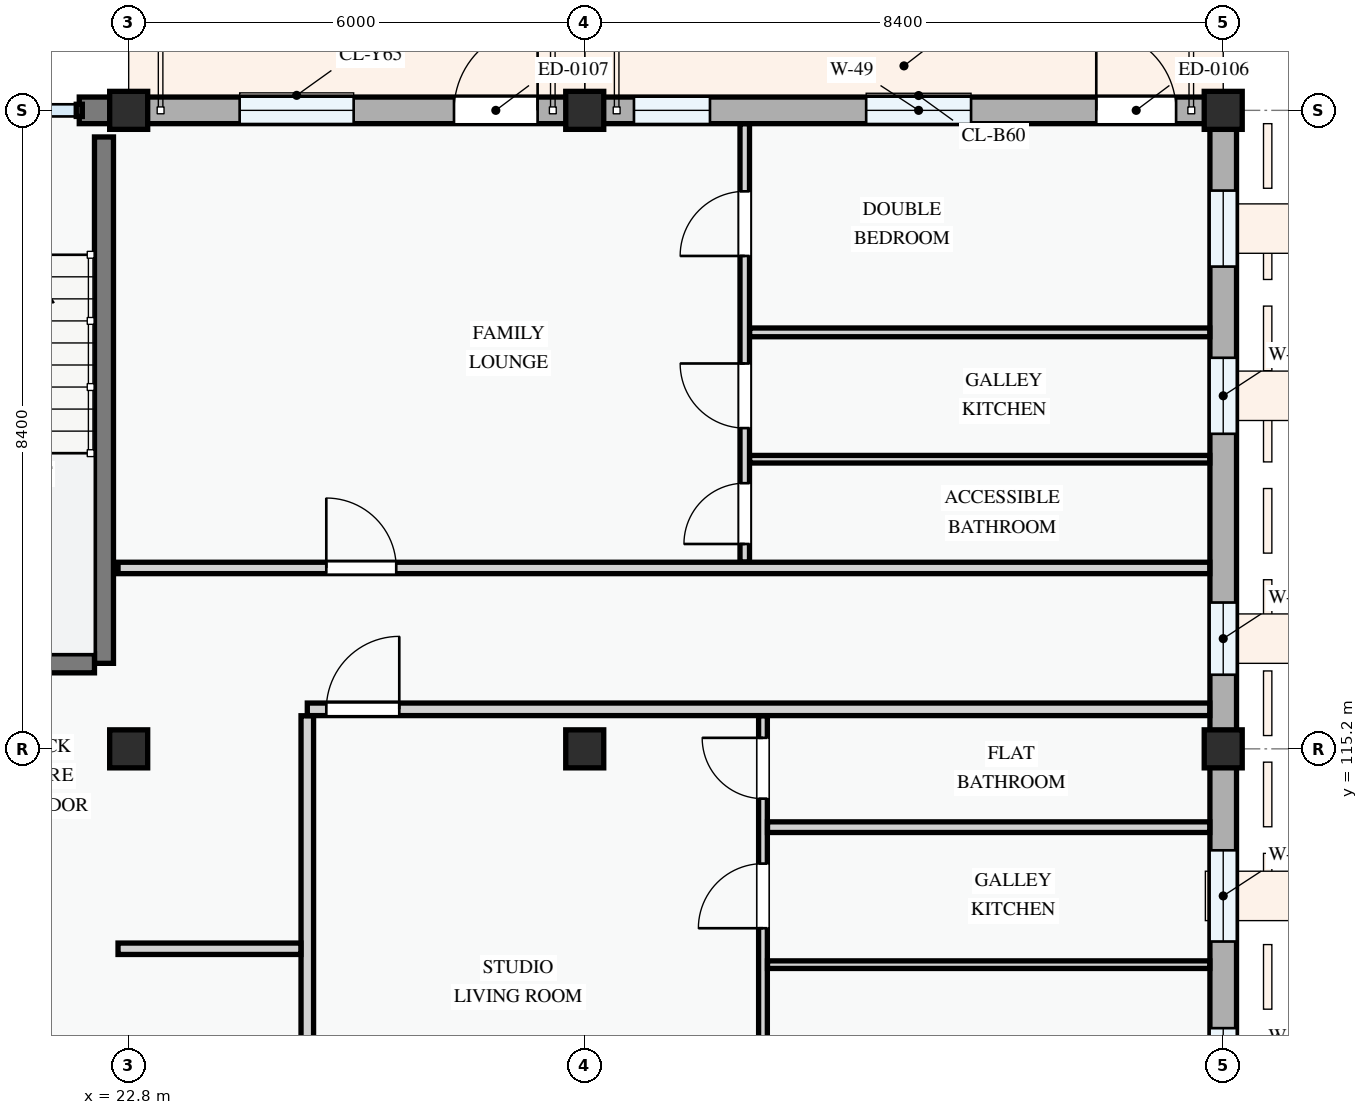
"""IFC4 building model, lengths in metres.
Left out: names, types, materials, properties, quantities, classifications, styles, units other than length and angle.
Written with IfcOpenShell. Run it as: python <this file> out.ifc"""

import sys

from ifc_helpers import new_model, si_unit, direction, frame, frame_2d, origin, origin_2d, place, context, subcontext, project, spatial, rectangle, extrude, element, fill, save


model = new_model("IFC4")
c1 = context("Model", 3, precision=1e-05, world=origin(), true_north=direction((0.0, 1.0)))
c2 = subcontext(c1, "Body", "Model", "MODEL_VIEW")
j1 = project(units=[si_unit("LENGTHUNIT", "METRE"), si_unit("PLANEANGLEUNIT", "RADIAN")], contexts=[c1])
p1 = place(None, origin())
s1 = spatial("IfcSite", under=j1, at=p1, CompositionType="ELEMENT")
p2 = place(p1, origin())
s2 = spatial("IfcBuilding", under=s1, at=p2, CompositionType="ELEMENT")
p3 = place(p2, frame((0.0, 0.0, 47.7)))
s3 = spatial("IfcBuildingStorey", under=s2, at=p3, CompositionType="ELEMENT", Elevation=47.7)
for number, where, z_axis, x_axis in (
    (1, (22.8, 115.2, 0.0), (0.0, 0.0, 1.0), (1.0, 0.0, 0.0)),
    (2, (22.8, 123.6, 0.0), (0.0, 0.0, 1.0), (1.0, 0.0, 0.0)),
    (3, (28.8, 115.2, 0.0), (0.0, 0.0, 1.0), (1.0, 0.0, 0.0)),
    (4, (28.8, 123.6, 0.0), (0.0, 0.0, 1.0), (1.0, 0.0, 0.0)),
    (5, (37.2, 115.2, 0.0), (0.0, 0.0, 1.0), (1.0, 0.0, 0.0)),
    (6, (37.2, 123.6, 0.0), (0.0, 0.0, 1.0), (1.0, 0.0, 0.0)),
):
    element("IfcColumn", number, at=place(p3, frame(where, z_axis=z_axis, x_axis=x_axis)), inside=s3, PredefinedType="COLUMN", context=c2, shape_type="SweptSolid", body=[
        extrude(rectangle(XDim=0.5, YDim=0.5, at=origin_2d()), origin(), (0.0, 0.0, 1.0), 3.3),
    ])
p4 = place(p3, frame((37.2, 109.2, 0.0), z_axis=(0.0, 0.0, 1.0), x_axis=(0.0, 1.0, 0.0)))
e7 = element("IfcWall", 7, at=p4, inside=s3, PredefinedType="STANDARD", context=c2, shape_type="SweptSolid", body=[
    extrude(rectangle(XDim=6.0, YDim=0.35, at=frame_2d((3.0, 0.0))), origin(), (0.0, 0.0, 1.0), 2.575),
])
p5 = place(p4, frame((1.025, 0.0, 0.78)))
e8 = element("IfcOpeningElement", 8, at=p5, cuts=e7, PredefinedType="OPENING", context=c2, shape_type="SweptSolid", body=[
    extrude(rectangle(XDim=1.3, YDim=1.4, at=frame_2d((0.65, 0.7))), frame((0.0, 0.185, 0.0), z_axis=(0.0, -1.0, 0.0), x_axis=(1.0, 0.0, 0.0)), (0.0, 0.0, 1.0), 0.37),
])
p6 = place(p4, frame((3.465, 0.0, 0.78)))
e9 = element("IfcOpeningElement", 9, at=p6, cuts=e7, PredefinedType="OPENING", context=c2, shape_type="SweptSolid", body=[
    extrude(rectangle(XDim=1.2, YDim=1.5, at=frame_2d((0.6, 0.75))), frame((0.0, 0.185, 0.0), z_axis=(0.0, -1.0, 0.0), x_axis=(1.0, 0.0, 0.0)), (0.0, 0.0, 1.0), 0.37),
])
p7 = place(p3, frame((37.2, 115.2, 0.0), z_axis=(0.0, 0.0, 1.0), x_axis=(0.0, 1.0, 0.0)))
e10 = element("IfcWall", 10, at=p7, inside=s3, PredefinedType="STANDARD", context=c2, shape_type="SweptSolid", body=[
    extrude(rectangle(XDim=8.4, YDim=0.35, at=frame_2d((4.2, 0.0))), origin(), (0.0, 0.0, 1.0), 2.425),
])
p8 = place(p7, frame((0.975, 0.0, 0.78)))
e11 = element("IfcOpeningElement", 11, at=p8, cuts=e10, PredefinedType="OPENING", context=c2, shape_type="SweptSolid", body=[
    extrude(rectangle(XDim=0.95, YDim=1.15, at=frame_2d((0.475, 0.575))), frame((0.0, 0.185, 0.0), z_axis=(0.0, -1.0, 0.0), x_axis=(1.0, 0.0, 0.0)), (0.0, 0.0, 1.0), 0.37),
])
p9 = place(p7, frame((4.145, 0.0, 0.78)))
e12 = element("IfcOpeningElement", 12, at=p9, cuts=e10, PredefinedType="OPENING", context=c2, shape_type="SweptSolid", body=[
    extrude(rectangle(XDim=1.0, YDim=1.25, at=frame_2d((0.5, 0.625))), frame((0.0, 0.185, 0.0), z_axis=(0.0, -1.0, 0.0), x_axis=(1.0, 0.0, 0.0)), (0.0, 0.0, 1.0), 0.37),
])
p10 = place(p7, frame((6.344, 0.0, 0.78)))
e13 = element("IfcOpeningElement", 13, at=p10, cuts=e10, PredefinedType="OPENING", context=c2, shape_type="SweptSolid", body=[
    extrude(rectangle(XDim=1.0, YDim=1.25, at=frame_2d((0.5, 0.625))), frame((0.0, 0.185, 0.0), z_axis=(0.0, -1.0, 0.0), x_axis=(1.0, 0.0, 0.0)), (0.0, 0.0, 1.0), 0.37),
])
p11 = place(p3, frame((37.2, 123.6, 0.0), z_axis=(0.0, 0.0, 1.0), x_axis=(-1.0, 0.0, 0.0)))
e14 = element("IfcWall", 14, at=p11, inside=s3, PredefinedType="STANDARD", context=c2, shape_type="SweptSolid", body=[
    extrude(rectangle(XDim=8.4, YDim=0.35, at=frame_2d((4.2, 0.0))), origin(), (0.0, 0.0, 1.0), 2.375),
])
p12 = place(p11, frame((0.62, 0.0, 0.0)))
e15 = element("IfcOpeningElement", 15, at=p12, cuts=e14, PredefinedType="OPENING", context=c2, shape_type="SweptSolid", body=[
    extrude(rectangle(XDim=1.05, YDim=2.15, at=frame_2d((0.525, 1.075))), frame((0.0, 0.185, 0.0), z_axis=(0.0, -1.0, 0.0), x_axis=(1.0, 0.0, 0.0)), (0.0, 0.0, 1.0), 0.37),
])
p13 = place(p11, frame((3.317, 0.0, 0.78)))
e16 = element("IfcOpeningElement", 16, at=p13, cuts=e14, PredefinedType="OPENING", context=c2, shape_type="SweptSolid", body=[
    extrude(rectangle(XDim=1.38, YDim=1.48, at=frame_2d((0.69, 0.74))), frame((0.0, 0.185, 0.0), z_axis=(0.0, -1.0, 0.0), x_axis=(1.0, 0.0, 0.0)), (0.0, 0.0, 1.0), 0.37),
])
p14 = place(p11, frame((6.752, 0.0, 0.78)))
e17 = element("IfcOpeningElement", 17, at=p14, cuts=e14, PredefinedType="OPENING", context=c2, shape_type="SweptSolid", body=[
    extrude(rectangle(XDim=1.0, YDim=1.25, at=frame_2d((0.5, 0.625))), frame((0.0, 0.185, 0.0), z_axis=(0.0, -1.0, 0.0), x_axis=(1.0, 0.0, 0.0)), (0.0, 0.0, 1.0), 0.37),
])
p15 = place(p3, frame((28.8, 123.6, 0.0), z_axis=(0.0, 0.0, 1.0), x_axis=(-1.0, 0.0, 0.0)))
e18 = element("IfcWall", 18, at=p15, inside=s3, PredefinedType="STANDARD", context=c2, shape_type="SweptSolid", body=[
    extrude(rectangle(XDim=6.0, YDim=0.35, at=frame_2d((3.0, 0.0))), origin(), (0.0, 0.0, 1.0), 2.525),
])
p16 = place(p15, frame((0.62, 0.0, 0.0)))
e19 = element("IfcOpeningElement", 19, at=p16, cuts=e18, PredefinedType="OPENING", context=c2, shape_type="SweptSolid", body=[
    extrude(rectangle(XDim=1.1, YDim=2.15, at=frame_2d((0.55, 1.075))), frame((0.0, 0.185, 0.0), z_axis=(0.0, -1.0, 0.0), x_axis=(1.0, 0.0, 0.0)), (0.0, 0.0, 1.0), 0.37),
])
p17 = place(p15, frame((3.04, 0.0, 0.78)))
e20 = element("IfcOpeningElement", 20, at=p17, cuts=e18, PredefinedType="OPENING", context=c2, shape_type="SweptSolid", body=[
    extrude(rectangle(XDim=1.5, YDim=1.5, at=frame_2d((0.75, 0.75))), frame((0.0, 0.185, 0.0), z_axis=(0.0, -1.0, 0.0), x_axis=(1.0, 0.0, 0.0)), (0.0, 0.0, 1.0), 0.37),
])
p18 = place(p3, frame((22.8, 123.6, 0.0), z_axis=(0.0, 0.0, 1.0), x_axis=(-1.0, 0.0, 0.0)))
e21 = element("IfcWall", 21, at=p18, inside=s3, PredefinedType="STANDARD", context=c2, shape_type="SweptSolid", body=[
    extrude(rectangle(XDim=0.65, YDim=0.35, at=frame_2d((0.325, 0.0))), origin(), (0.0, 0.0, 1.0), 3.04),
])
p19 = place(p3, frame((22.475, 123.25, 0.0), z_axis=(0.0, 0.0, 1.0), x_axis=(0.0, -1.0, 0.0)))
e22 = element("IfcWall", 22, at=p19, inside=s3, PredefinedType="SHEAR", context=c2, shape_type="SweptSolid", body=[
    extrude(rectangle(XDim=6.925, YDim=0.25, at=frame_2d((3.462, 0.0))), origin(), (0.0, 0.0, 1.0), 3.0),
])
p20 = place(p3, frame((8.85, 116.325, 0.0), z_axis=(0.0, 0.0, 1.0), x_axis=(1.0, 0.0, 0.0)))
e23 = element("IfcWall", 23, at=p20, inside=s3, PredefinedType="SHEAR", context=c2, shape_type="SweptSolid", body=[
    extrude(rectangle(XDim=13.5, YDim=0.25, at=frame_2d((6.75, 0.0))), origin(), (0.0, 0.0, 1.0), 3.0),
])
p21 = place(p20, frame((6.2, 0.0, 0.0)))
e24 = element("IfcOpeningElement", 24, at=p21, cuts=e23, PredefinedType="OPENING", context=c2, shape_type="SweptSolid", body=[
    extrude(rectangle(XDim=1.1, YDim=2.15, at=frame_2d((0.55, 1.075))), frame((0.0, 0.135, 0.0), z_axis=(0.0, -1.0, 0.0), x_axis=(1.0, 0.0, 0.0)), (0.0, 0.0, 1.0), 0.27),
])
p22 = place(p3, frame((25.15, 109.377, 0.0), z_axis=(0.0, 0.0, 1.0), x_axis=(0.0, 1.0, 0.0)))
e25 = element("IfcWall", 25, at=p22, inside=s3, PredefinedType="PARTITIONING", context=c2, shape_type="SweptSolid", body=[
    extrude(rectangle(XDim=6.259, YDim=0.165, at=frame_2d((3.129, 0.0))), origin(), (0.0, 0.0, 1.0), 3.0),
])
p23 = place(p3, frame((22.66, 112.57, 0.0), z_axis=(0.0, 0.0, 1.0), x_axis=(1.0, 0.0, 0.0)))
e26 = element("IfcWall", 26, at=p23, inside=s3, PredefinedType="PARTITIONING", context=c2, shape_type="SweptSolid", body=[
    extrude(rectangle(XDim=2.406, YDim=0.15, at=frame_2d((1.203, 0.0))), origin(), (0.0, 0.0, 1.0), 3.0),
])
p24 = place(p3, frame((31.145, 109.377, 0.0), z_axis=(0.0, 0.0, 1.0), x_axis=(0.0, 1.0, 0.0)))
e27 = element("IfcWall", 27, at=p24, inside=s3, PredefinedType="PARTITIONING", context=c2, shape_type="SweptSolid", body=[
    extrude(rectangle(XDim=6.259, YDim=0.115, at=frame_2d((3.129, 0.0))), origin(), (0.0, 0.0, 1.0), 3.0),
])
p25 = place(p24, frame((1.008, 0.0, 0.0)))
e28 = element("IfcOpeningElement", 28, at=p25, cuts=e27, PredefinedType="OPENING", context=c2, shape_type="SweptSolid", body=[
    extrude(rectangle(XDim=0.85, YDim=2.1, at=frame_2d((0.425, 1.05))), frame((0.0, 0.067, 0.0), z_axis=(0.0, -1.0, 0.0), x_axis=(1.0, 0.0, 0.0)), (0.0, 0.0, 1.0), 0.135),
])
p26 = place(p24, frame((3.463, 0.0, 0.0)))
e29 = element("IfcOpeningElement", 29, at=p26, cuts=e27, PredefinedType="OPENING", context=c2, shape_type="SweptSolid", body=[
    extrude(rectangle(XDim=0.85, YDim=2.1, at=frame_2d((0.425, 1.05))), frame((0.0, 0.067, 0.0), z_axis=(0.0, -1.0, 0.0), x_axis=(1.0, 0.0, 0.0)), (0.0, 0.0, 1.0), 0.135),
])
p27 = place(p24, frame((5.168, 0.0, 0.0)))
e30 = element("IfcOpeningElement", 30, at=p27, cuts=e27, PredefinedType="OPENING", context=c2, shape_type="SweptSolid", body=[
    extrude(rectangle(XDim=0.8, YDim=2.1, at=frame_2d((0.4, 1.05))), frame((0.0, 0.067, 0.0), z_axis=(0.0, -1.0, 0.0), x_axis=(1.0, 0.0, 0.0)), (0.0, 0.0, 1.0), 0.135),
])
p28 = place(p3, frame((31.205, 112.361, 0.0), z_axis=(0.0, 0.0, 1.0), x_axis=(1.0, 0.0, 0.0)))
e31 = element("IfcWall", 31, at=p28, inside=s3, PredefinedType="PARTITIONING", context=c2, shape_type="SweptSolid", body=[
    extrude(rectangle(XDim=5.818, YDim=0.1, at=frame_2d((2.909, 0.0))), origin(), (0.0, 0.0, 1.0), 3.0),
])
p29 = place(p3, frame((31.205, 114.17, 0.0), z_axis=(0.0, 0.0, 1.0), x_axis=(1.0, 0.0, 0.0)))
e32 = element("IfcWall", 32, at=p29, inside=s3, PredefinedType="PARTITIONING", context=c2, shape_type="SweptSolid", body=[
    extrude(rectangle(XDim=5.818, YDim=0.14, at=frame_2d((2.909, 0.0))), origin(), (0.0, 0.0, 1.0), 3.0),
])
p30 = place(p3, frame((30.905, 117.657, 0.0), z_axis=(0.0, 0.0, 1.0), x_axis=(0.0, 1.0, 0.0)))
e33 = element("IfcWall", 33, at=p30, inside=s3, PredefinedType="PARTITIONING", context=c2, shape_type="SweptSolid", body=[
    extrude(rectangle(XDim=5.766, YDim=0.125, at=frame_2d((2.883, 0.0))), origin(), (0.0, 0.0, 1.0), 3.0),
])
p31 = place(p30, frame((0.238, 0.0, 0.0)))
e34 = element("IfcOpeningElement", 34, at=p31, cuts=e33, PredefinedType="OPENING", context=c2, shape_type="SweptSolid", body=[
    extrude(rectangle(XDim=0.8, YDim=2.1, at=frame_2d((0.4, 1.05))), frame((0.0, 0.073, 0.0), z_axis=(0.0, -1.0, 0.0), x_axis=(1.0, 0.0, 0.0)), (0.0, 0.0, 1.0), 0.145),
])
p32 = place(p30, frame((1.763, 0.0, 0.0)))
e35 = element("IfcOpeningElement", 35, at=p32, cuts=e33, PredefinedType="OPENING", context=c2, shape_type="SweptSolid", body=[
    extrude(rectangle(XDim=0.85, YDim=2.1, at=frame_2d((0.425, 1.05))), frame((0.0, 0.073, 0.0), z_axis=(0.0, -1.0, 0.0), x_axis=(1.0, 0.0, 0.0)), (0.0, 0.0, 1.0), 0.145),
])
p33 = place(p30, frame((4.028, 0.0, 0.0)))
e36 = element("IfcOpeningElement", 36, at=p33, cuts=e33, PredefinedType="OPENING", context=c2, shape_type="SweptSolid", body=[
    extrude(rectangle(XDim=0.85, YDim=2.1, at=frame_2d((0.425, 1.05))), frame((0.0, 0.073, 0.0), z_axis=(0.0, -1.0, 0.0), x_axis=(1.0, 0.0, 0.0)), (0.0, 0.0, 1.0), 0.145),
])
p34 = place(p3, frame((30.97, 120.679, 0.0), z_axis=(0.0, 0.0, 1.0), x_axis=(1.0, 0.0, 0.0)))
e37 = element("IfcWall", 37, at=p34, inside=s3, PredefinedType="PARTITIONING", context=c2, shape_type="SweptSolid", body=[
    extrude(rectangle(XDim=6.053, YDim=0.115, at=frame_2d((3.027, 0.0))), origin(), (0.0, 0.0, 1.0), 3.0),
])
p35 = place(p3, frame((30.97, 119.01, 0.0), z_axis=(0.0, 0.0, 1.0), x_axis=(1.0, 0.0, 0.0)))
e38 = element("IfcWall", 38, at=p35, inside=s3, PredefinedType="PARTITIONING", context=c2, shape_type="SweptSolid", body=[
    extrude(rectangle(XDim=6.053, YDim=0.1, at=frame_2d((3.027, 0.0))), origin(), (0.0, 0.0, 1.0), 3.0),
])
p36 = place(p3, frame((25.15, 115.72, 0.0), z_axis=(0.0, 0.0, 1.0), x_axis=(1.0, 0.0, 0.0)))
e39 = element("IfcWall", 39, at=p36, inside=s3, PredefinedType="PARTITIONING", context=c2, shape_type="SweptSolid", body=[
    extrude(rectangle(XDim=11.873, YDim=0.165, at=frame_2d((5.937, 0.0))), origin(), (0.0, 0.0, 1.0), 3.0),
])
p37 = place(p36, frame((0.25, 0.0, 0.0)))
e40 = element("IfcOpeningElement", 40, at=p37, cuts=e39, PredefinedType="OPENING", context=c2, shape_type="SweptSolid", body=[
    extrude(rectangle(XDim=0.96, YDim=2.12, at=frame_2d((0.48, 1.06))), frame((0.0, 0.093, 0.0), z_axis=(0.0, -1.0, 0.0), x_axis=(1.0, 0.0, 0.0)), (0.0, 0.0, 1.0), 0.185),
])
p38 = place(p3, frame((22.66, 117.58, 0.0), z_axis=(0.0, 0.0, 1.0), x_axis=(1.0, 0.0, 0.0)))
e41 = element("IfcWall", 41, at=p38, inside=s3, PredefinedType="PARTITIONING", context=c2, shape_type="SweptSolid", body=[
    extrude(rectangle(XDim=14.363, YDim=0.15, at=frame_2d((7.182, 0.0))), origin(), (0.0, 0.0, 1.0), 3.0),
])
p39 = place(p38, frame((2.74, 0.0, 0.0)))
e42 = element("IfcOpeningElement", 42, at=p39, cuts=e41, PredefinedType="OPENING", context=c2, shape_type="SweptSolid", body=[
    extrude(rectangle(XDim=0.92, YDim=2.1, at=frame_2d((0.46, 1.05))), frame((0.0, 0.085, 0.0), z_axis=(0.0, -1.0, 0.0), x_axis=(1.0, 0.0, 0.0)), (0.0, 0.0, 1.0), 0.17),
])
p40 = place(p5, origin())
e43 = element("IfcWindow", 43, at=p40, inside=s3, PartitioningType="SINGLE_PANEL", PredefinedType="WINDOW", context=c2, shape_type="SweptSolid", body=[
    extrude(rectangle(XDim=1.3, YDim=1.4, at=frame_2d((0.65, 0.7))), frame((0.0, 0.03, 0.0), z_axis=(0.0, -1.0, 0.0), x_axis=(1.0, 0.0, 0.0)), (0.0, 0.0, 1.0), 0.06),
])
fill(e8, e43)
p41 = place(p6, origin())
e44 = element("IfcWindow", 44, at=p41, inside=s3, PartitioningType="SINGLE_PANEL", PredefinedType="WINDOW", context=c2, shape_type="SweptSolid", body=[
    extrude(rectangle(XDim=1.2, YDim=1.5, at=frame_2d((0.6, 0.75))), frame((0.0, 0.03, 0.0), z_axis=(0.0, -1.0, 0.0), x_axis=(1.0, 0.0, 0.0)), (0.0, 0.0, 1.0), 0.06),
])
fill(e9, e44)
p42 = place(p8, origin())
e45 = element("IfcWindow", 45, at=p42, inside=s3, PartitioningType="SINGLE_PANEL", PredefinedType="WINDOW", context=c2, shape_type="SweptSolid", body=[
    extrude(rectangle(XDim=0.95, YDim=1.15, at=frame_2d((0.475, 0.575))), frame((0.0, 0.03, 0.0), z_axis=(0.0, -1.0, 0.0), x_axis=(1.0, 0.0, 0.0)), (0.0, 0.0, 1.0), 0.06),
])
fill(e11, e45)
p43 = place(p9, origin())
e46 = element("IfcWindow", 46, at=p43, inside=s3, PartitioningType="SINGLE_PANEL", PredefinedType="WINDOW", context=c2, shape_type="SweptSolid", body=[
    extrude(rectangle(XDim=1.0, YDim=1.25, at=frame_2d((0.5, 0.625))), frame((0.0, 0.03, 0.0), z_axis=(0.0, -1.0, 0.0), x_axis=(1.0, 0.0, 0.0)), (0.0, 0.0, 1.0), 0.06),
])
fill(e12, e46)
p44 = place(p10, origin())
e47 = element("IfcWindow", 47, at=p44, inside=s3, PartitioningType="SINGLE_PANEL", PredefinedType="WINDOW", context=c2, shape_type="SweptSolid", body=[
    extrude(rectangle(XDim=1.0, YDim=1.25, at=frame_2d((0.5, 0.625))), frame((0.0, 0.03, 0.0), z_axis=(0.0, -1.0, 0.0), x_axis=(1.0, 0.0, 0.0)), (0.0, 0.0, 1.0), 0.06),
])
fill(e13, e47)
p45 = place(p12, frame((1.05, 0.0, 0.0), z_axis=(0.0, 0.0, 1.0), x_axis=(-1.0, 0.0, 0.0)))
e48 = element("IfcDoor", 48, at=p45, inside=s3, OperationType="SINGLE_SWING_LEFT", PredefinedType="DOOR", context=c2, shape_type="SweptSolid", body=[
    extrude(rectangle(XDim=1.05, YDim=2.15, at=frame_2d((0.525, 1.075))), frame((0.0, 0.025, 0.0), z_axis=(0.0, -1.0, 0.0), x_axis=(1.0, 0.0, 0.0)), (0.0, 0.0, 1.0), 0.05),
])
fill(e15, e48)
p46 = place(p13, origin())
e49 = element("IfcWindow", 49, at=p46, inside=s3, PartitioningType="SINGLE_PANEL", PredefinedType="WINDOW", context=c2, shape_type="SweptSolid", body=[
    extrude(rectangle(XDim=1.38, YDim=1.48, at=frame_2d((0.69, 0.74))), frame((0.0, 0.03, 0.0), z_axis=(0.0, -1.0, 0.0), x_axis=(1.0, 0.0, 0.0)), (0.0, 0.0, 1.0), 0.06),
])
fill(e16, e49)
p47 = place(p14, origin())
e50 = element("IfcWindow", 50, at=p47, inside=s3, PartitioningType="SINGLE_PANEL", PredefinedType="WINDOW", context=c2, shape_type="SweptSolid", body=[
    extrude(rectangle(XDim=1.0, YDim=1.25, at=frame_2d((0.5, 0.625))), frame((0.0, 0.03, 0.0), z_axis=(0.0, -1.0, 0.0), x_axis=(1.0, 0.0, 0.0)), (0.0, 0.0, 1.0), 0.06),
])
fill(e17, e50)
p48 = place(p16, frame((1.1, 0.0, 0.0), z_axis=(0.0, 0.0, 1.0), x_axis=(-1.0, 0.0, 0.0)))
e51 = element("IfcDoor", 51, at=p48, inside=s3, OperationType="SINGLE_SWING_RIGHT", PredefinedType="DOOR", context=c2, shape_type="SweptSolid", body=[
    extrude(rectangle(XDim=1.1, YDim=2.15, at=frame_2d((0.55, 1.075))), frame((0.0, 0.025, 0.0), z_axis=(0.0, -1.0, 0.0), x_axis=(1.0, 0.0, 0.0)), (0.0, 0.0, 1.0), 0.05),
])
fill(e19, e51)
p49 = place(p17, origin())
e52 = element("IfcWindow", 52, at=p49, inside=s3, PartitioningType="SINGLE_PANEL", PredefinedType="WINDOW", context=c2, shape_type="SweptSolid", body=[
    extrude(rectangle(XDim=1.5, YDim=1.5, at=frame_2d((0.75, 0.75))), frame((0.0, 0.03, 0.0), z_axis=(0.0, -1.0, 0.0), x_axis=(1.0, 0.0, 0.0)), (0.0, 0.0, 1.0), 0.06),
])
fill(e20, e52)
p50 = place(p26, origin())
e53 = element("IfcDoor", 53, at=p50, inside=s3, OperationType="SINGLE_SWING_LEFT", PredefinedType="DOOR", context=c2, shape_type="SweptSolid", body=[
    extrude(rectangle(XDim=0.85, YDim=2.1, at=frame_2d((0.425, 1.05))), frame((0.0, 0.025, 0.0), z_axis=(0.0, -1.0, 0.0), x_axis=(1.0, 0.0, 0.0)), (0.0, 0.0, 1.0), 0.05),
])
fill(e29, e53)
p51 = place(p27, origin())
e54 = element("IfcDoor", 54, at=p51, inside=s3, OperationType="SINGLE_SWING_RIGHT", PredefinedType="DOOR", context=c2, shape_type="SweptSolid", body=[
    extrude(rectangle(XDim=0.8, YDim=2.1, at=frame_2d((0.4, 1.05))), frame((0.0, 0.025, 0.0), z_axis=(0.0, -1.0, 0.0), x_axis=(1.0, 0.0, 0.0)), (0.0, 0.0, 1.0), 0.05),
])
fill(e30, e54)
p52 = place(p31, origin())
e55 = element("IfcDoor", 55, at=p52, inside=s3, OperationType="SINGLE_SWING_LEFT", PredefinedType="DOOR", context=c2, shape_type="SweptSolid", body=[
    extrude(rectangle(XDim=0.8, YDim=2.1, at=frame_2d((0.4, 1.05))), frame((0.0, 0.025, 0.0), z_axis=(0.0, -1.0, 0.0), x_axis=(1.0, 0.0, 0.0)), (0.0, 0.0, 1.0), 0.05),
])
fill(e34, e55)
p53 = place(p32, origin())
e56 = element("IfcDoor", 56, at=p53, inside=s3, OperationType="SINGLE_SWING_RIGHT", PredefinedType="DOOR", context=c2, shape_type="SweptSolid", body=[
    extrude(rectangle(XDim=0.85, YDim=2.1, at=frame_2d((0.425, 1.05))), frame((0.0, 0.025, 0.0), z_axis=(0.0, -1.0, 0.0), x_axis=(1.0, 0.0, 0.0)), (0.0, 0.0, 1.0), 0.05),
])
fill(e35, e56)
p54 = place(p33, origin())
e57 = element("IfcDoor", 57, at=p54, inside=s3, OperationType="SINGLE_SWING_LEFT", PredefinedType="DOOR", context=c2, shape_type="SweptSolid", body=[
    extrude(rectangle(XDim=0.85, YDim=2.1, at=frame_2d((0.425, 1.05))), frame((0.0, 0.025, 0.0), z_axis=(0.0, -1.0, 0.0), x_axis=(1.0, 0.0, 0.0)), (0.0, 0.0, 1.0), 0.05),
])
fill(e36, e57)
p55 = place(p37, origin())
e58 = element("IfcDoor", 58, at=p55, inside=s3, OperationType="SINGLE_SWING_RIGHT", PredefinedType="DOOR", context=c2, shape_type="SweptSolid", body=[
    extrude(rectangle(XDim=0.96, YDim=2.12, at=frame_2d((0.48, 1.06))), frame((0.0, 0.025, 0.0), z_axis=(0.0, -1.0, 0.0), x_axis=(1.0, 0.0, 0.0)), (0.0, 0.0, 1.0), 0.05),
])
fill(e40, e58)
p56 = place(p39, origin())
e59 = element("IfcDoor", 59, at=p56, inside=s3, OperationType="SINGLE_SWING_LEFT", PredefinedType="DOOR", context=c2, shape_type="SweptSolid", body=[
    extrude(rectangle(XDim=0.92, YDim=2.1, at=frame_2d((0.46, 1.05))), frame((0.0, 0.025, 0.0), z_axis=(0.0, -1.0, 0.0), x_axis=(1.0, 0.0, 0.0)), (0.0, 0.0, 1.0), 0.05),
])
fill(e42, e59)
save(model, sys.argv[1])
